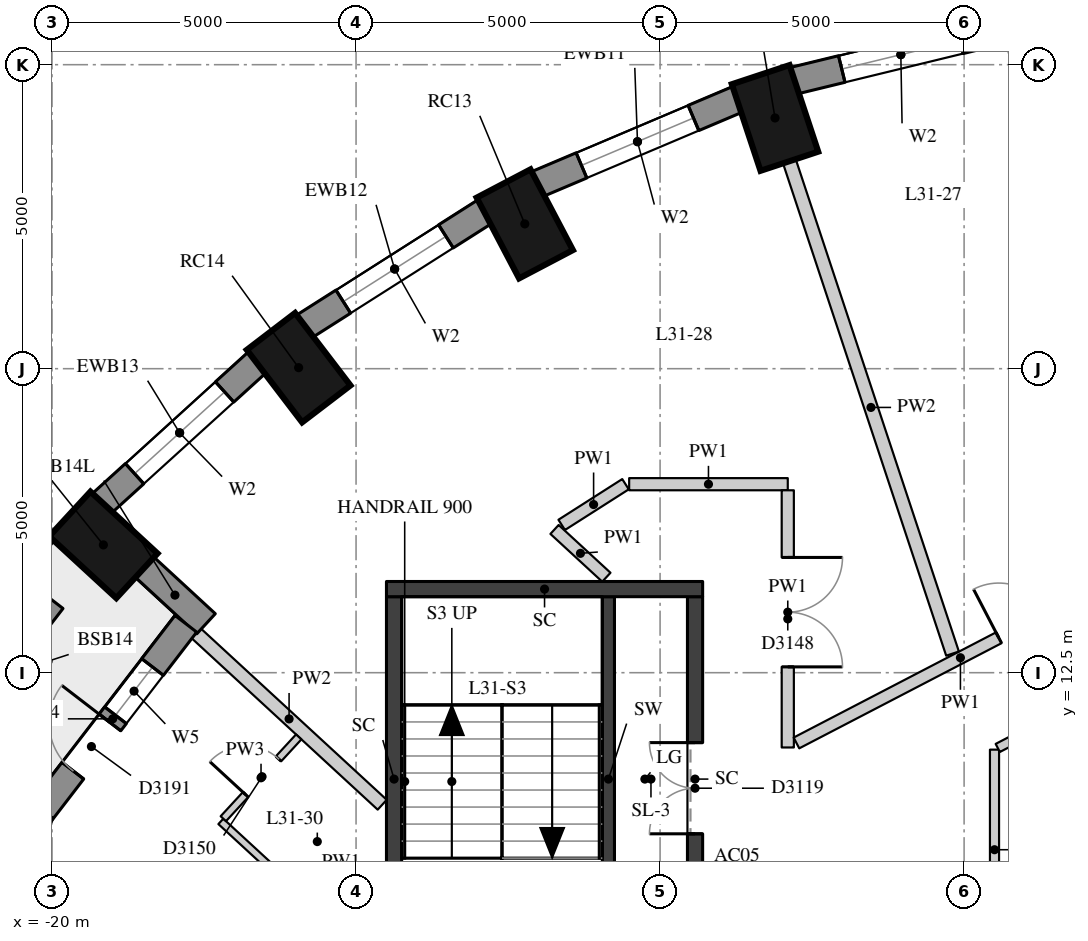
"""IFC4 building model, lengths in metres.
Left out: names, types, materials, properties, quantities, classifications, styles, units other than length and angle.
Written with IfcOpenShell. Run it as: python <this file> out.ifc"""

import sys

from ifc_helpers import new_model, si_unit, direction, frame, frame_2d, origin, origin_2d, place, context, subcontext, project, spatial, rectangle, extrude, element, fill, save


model = new_model("IFC4")
c1 = context("Model", 3, precision=1e-05, world=origin(), true_north=direction((0.0, 1.0)))
c2 = subcontext(c1, "Body", "Model", "MODEL_VIEW")
j1 = project(units=[si_unit("LENGTHUNIT", "METRE"), si_unit("PLANEANGLEUNIT", "RADIAN")], contexts=[c1])
p1 = place(None, origin())
s1 = spatial("IfcSite", under=j1, at=p1, CompositionType="ELEMENT")
p2 = place(p1, origin())
s2 = spatial("IfcBuilding", under=s1, at=p2, CompositionType="ELEMENT")
p3 = place(p2, frame((0.0, 0.0, 112.0)))
s3 = spatial("IfcBuildingStorey", under=s2, at=p3, CompositionType="ELEMENT", Elevation=112.0)
for number, where, z_axis, x_axis in (
    (1, (-3.724, 22.691, 0.0), (0.0, 0.0, 1.0), (-0.159, 0.987, 0.0)),
    (2, (-8.11, 21.624, 0.0), (0.0, 0.0, 1.0), (-0.315, 0.949, 0.0)),
    (3, (-12.225, 19.882, 0.0), (0.0, 0.0, 1.0), (-0.465, 0.885, 0.0)),
    (4, (-15.945, 17.517, 0.0), (0.0, 0.0, 1.0), (-0.607, 0.795, 0.0)),
    (5, (-19.156, 14.602, 0.0), (0.0, 0.0, 1.0), (-0.735, 0.678, 0.0)),
):
    element("IfcColumn", number, at=place(p3, frame(where, z_axis=z_axis, x_axis=x_axis)), inside=s3, PredefinedType="COLUMN", context=c2, shape_type="SweptSolid", body=[
        extrude(rectangle(XDim=1.5, YDim=1.0, at=origin_2d()), origin(), (0.0, 0.0, 1.0), 3.3),
    ])
p4 = place(p3, frame((-4.275, 23.094, 0.0), z_axis=(0.0, 0.0, 1.0), x_axis=(-0.971667603162, -0.236351579148, 0.0)))
e6 = element("IfcWall", 6, at=p4, inside=s3, PredefinedType="SOLIDWALL", context=c2, shape_type="SweptSolid", body=[
    extrude(rectangle(XDim=3.635, YDim=0.45, at=frame_2d((1.817, 0.0))), origin(), (0.0, 0.0, 1.0), 3.02),
])
p5 = place(p4, frame((0.817, 0.0, 0.4)))
e7 = element("IfcOpeningElement", 7, at=p5, cuts=e6, PredefinedType="OPENING", context=c2, shape_type="SweptSolid", body=[
    extrude(rectangle(XDim=2.0, YDim=1.75, at=frame_2d((1.0, 0.875))), frame((0.0, 0.235, 0.0), z_axis=(0.0, -1.0, 0.0), x_axis=(1.0, 0.0, 0.0)), (0.0, 0.0, 1.0), 0.47),
])
p6 = place(p3, frame((-8.718, 21.934, 0.0), z_axis=(0.0, 0.0, 1.0), x_axis=(-0.920879975612, -0.389846213932, 0.0)))
e8 = element("IfcWall", 8, at=p6, inside=s3, PredefinedType="SOLIDWALL", context=c2, shape_type="SweptSolid", body=[
    extrude(rectangle(XDim=3.592, YDim=0.45, at=frame_2d((1.796, 0.0))), origin(), (0.0, 0.0, 1.0), 3.02),
])
p7 = place(p6, frame((0.796, 0.0, 0.4)))
e9 = element("IfcOpeningElement", 9, at=p7, cuts=e8, PredefinedType="OPENING", context=c2, shape_type="SweptSolid", body=[
    extrude(rectangle(XDim=2.0, YDim=1.75, at=frame_2d((1.0, 0.875))), frame((0.0, 0.235, 0.0), z_axis=(0.0, -1.0, 0.0), x_axis=(1.0, 0.0, 0.0)), (0.0, 0.0, 1.0), 0.47),
])
p8 = place(p3, frame((-12.875, 20.087, 0.0), z_axis=(0.0, 0.0, 1.0), x_axis=(-0.843860651879, -0.536562391722, 0.0)))
e10 = element("IfcWall", 10, at=p8, inside=s3, PredefinedType="SOLIDWALL", context=c2, shape_type="SweptSolid", body=[
    extrude(rectangle(XDim=3.532, YDim=0.45, at=frame_2d((1.766, 0.0))), origin(), (0.0, 0.0, 1.0), 3.02),
])
p9 = place(p8, frame((0.766, 0.0, 0.4)))
e11 = element("IfcOpeningElement", 11, at=p9, cuts=e10, PredefinedType="OPENING", context=c2, shape_type="SweptSolid", body=[
    extrude(rectangle(XDim=2.0, YDim=1.75, at=frame_2d((1.0, 0.875))), frame((0.0, 0.235, 0.0), z_axis=(0.0, -1.0, 0.0), x_axis=(1.0, 0.0, 0.0)), (0.0, 0.0, 1.0), 0.47),
])
p10 = place(p3, frame((-16.62, 17.61, 0.0), z_axis=(0.0, 0.0, 1.0), x_axis=(-0.74032902847, -0.672244694739, 0.0)))
e12 = element("IfcWall", 12, at=p10, inside=s3, PredefinedType="SOLIDWALL", context=c2, shape_type="SweptSolid", body=[
    extrude(rectangle(XDim=3.464, YDim=0.45, at=frame_2d((1.732, 0.0))), origin(), (0.0, 0.0, 1.0), 3.02),
])
p11 = place(p10, frame((0.732, 0.0, 0.4)))
e13 = element("IfcOpeningElement", 13, at=p11, cuts=e12, PredefinedType="OPENING", context=c2, shape_type="SweptSolid", body=[
    extrude(rectangle(XDim=2.0, YDim=1.75, at=frame_2d((1.0, 0.875))), frame((0.0, 0.235, 0.0), z_axis=(0.0, -1.0, 0.0), x_axis=(1.0, 0.0, 0.0)), (0.0, 0.0, 1.0), 0.47),
])
p12 = place(p3, frame((-18.49, 14.247, 0.0), z_axis=(0.0, 0.0, 1.0), x_axis=(0.735307968822, -0.67773312667, 0.0)))
e14 = element("IfcWall", 14, at=p12, inside=s3, PredefinedType="SOLIDWALL", context=c2, shape_type="SweptSolid", body=[
    extrude(rectangle(XDim=1.391, YDim=0.45, at=frame_2d((0.695, 0.0))), origin(), (0.0, 0.0, 1.0), 3.02),
])
p13 = place(p3, frame((-17.799, 13.304, 0.0), z_axis=(0.0, 0.0, 1.0), x_axis=(-0.609698797728, -0.792633191362, 0.0)))
e15 = element("IfcWall", 15, at=p13, inside=s3, PredefinedType="SOLIDWALL", context=c2, shape_type="SweptSolid", body=[
    extrude(rectangle(XDim=3.945, YDim=0.45, at=frame_2d((1.973, 0.0))), origin(), (0.0, 0.0, 1.0), 3.02),
])
p14 = place(p13, frame((0.897, 0.0, 0.4)))
e16 = element("IfcOpeningElement", 16, at=p14, cuts=e15, PredefinedType="OPENING", context=c2, shape_type="SweptSolid", body=[
    extrude(rectangle(XDim=1.0, YDim=1.75, at=frame_2d((0.5, 0.875))), frame((0.0, 0.235, 0.0), z_axis=(0.0, -1.0, 0.0), x_axis=(1.0, 0.0, 0.0)), (0.0, 0.0, 1.0), 0.47),
])
p15 = place(p13, frame((2.047, 0.0, 0.0)))
e17 = element("IfcOpeningElement", 17, at=p15, cuts=e15, PredefinedType="OPENING", context=c2, shape_type="SweptSolid", body=[
    extrude(rectangle(XDim=1.0, YDim=2.15, at=frame_2d((0.5, 1.075))), frame((0.0, 0.235, 0.0), z_axis=(0.0, -1.0, 0.0), x_axis=(1.0, 0.0, 0.0)), (0.0, 0.0, 1.0), 0.47),
])
p16 = place(p3, frame((-20.182, 10.212, 0.0), z_axis=(0.0, 0.0, 1.0), x_axis=(-0.455932890657, -0.890014156751, 0.0)))
e18 = element("IfcWall", 18, at=p16, inside=s3, PredefinedType="SOLIDWALL", context=c2, shape_type="SweptSolid", body=[
    extrude(rectangle(XDim=3.888, YDim=0.45, at=frame_2d((1.944, 0.0))), origin(), (0.0, 0.0, 1.0), 3.02),
])
p17 = place(p16, frame((0.869, 0.0, 0.4)))
e19 = element("IfcOpeningElement", 19, at=p17, cuts=e18, PredefinedType="OPENING", context=c2, shape_type="SweptSolid", body=[
    extrude(rectangle(XDim=1.0, YDim=1.75, at=frame_2d((0.5, 0.875))), frame((0.0, 0.235, 0.0), z_axis=(0.0, -1.0, 0.0), x_axis=(1.0, 0.0, 0.0)), (0.0, 0.0, 1.0), 0.47),
])
p18 = place(p16, frame((2.019, 0.0, 0.0)))
e20 = element("IfcOpeningElement", 20, at=p18, cuts=e18, PredefinedType="OPENING", context=c2, shape_type="SweptSolid", body=[
    extrude(rectangle(XDim=1.0, YDim=2.15, at=frame_2d((0.5, 1.075))), frame((0.0, 0.235, 0.0), z_axis=(0.0, -1.0, 0.0), x_axis=(1.0, 0.0, 0.0)), (0.0, 0.0, 1.0), 0.47),
])
p19 = place(p3, frame((-20.096, 13.77, 0.0), z_axis=(0.0, 0.0, 1.0), x_axis=(-0.610752434717, -0.791821610899, 0.0)))
e21 = element("IfcWall", 21, at=p19, inside=s3, PredefinedType="USERDEFINED", context=c2, shape_type="SweptSolid", body=[
    extrude(rectangle(XDim=1.8, YDim=0.7, at=frame_2d((0.9, 0.0))), origin(), (0.0, 0.0, 1.0), 0.75),
])
p20 = place(p3, frame((-10.85, 7.75, 0.0), z_axis=(0.0, 0.0, 1.0), x_axis=(0.0, 1.0, 0.0)))
e22 = element("IfcWall", 22, at=p20, inside=s3, PredefinedType="SHEAR", context=c2, shape_type="SweptSolid", body=[
    extrude(rectangle(XDim=6.0, YDim=0.2, at=frame_2d((3.0, 0.0))), origin(), (0.0, 0.0, 1.0), 3.02),
])
p21 = place(p20, frame((0.1, 0.0, 0.0)))
e23 = element("IfcOpeningElement", 23, at=p21, cuts=e22, PredefinedType="OPENING", context=c2, shape_type="SweptSolid", body=[
    extrude(rectangle(XDim=1.5, YDim=2.1, at=frame_2d((0.75, 1.05))), frame((0.0, 0.11, 0.0), z_axis=(0.0, -1.0, 0.0), x_axis=(1.0, 0.0, 0.0)), (0.0, 0.0, 1.0), 0.22),
])
p22 = place(p3, frame((-14.375, 7.75, -0.28), z_axis=(0.0, 0.0, 1.0), x_axis=(0.0, 1.0, 0.0)))
e24 = element("IfcWall", 24, at=p22, inside=s3, PredefinedType="SHEAR", context=c2, shape_type="SweptSolid", body=[
    extrude(rectangle(XDim=6.0, YDim=0.25, at=frame_2d((3.0, 0.0))), origin(), (0.0, 0.0, 1.0), 3.3),
])
p23 = place(p3, frame((-9.425, 7.75, -0.28), z_axis=(0.0, 0.0, 1.0), x_axis=(0.0, 1.0, 0.0)))
e25 = element("IfcWall", 25, at=p23, inside=s3, PredefinedType="SHEAR", context=c2, shape_type="SweptSolid", body=[
    extrude(rectangle(XDim=6.0, YDim=0.25, at=frame_2d((3.0, 0.0))), origin(), (0.0, 0.0, 1.0), 3.3),
])
p24 = place(p23, frame((2.1, 0.0, 0.28)))
e26 = element("IfcOpeningElement", 26, at=p24, cuts=e25, PredefinedType="OPENING", context=c2, shape_type="SweptSolid", body=[
    extrude(rectangle(XDim=1.5, YDim=2.1, at=frame_2d((0.75, 1.05))), frame((0.0, 0.135, 0.0), z_axis=(0.0, -1.0, 0.0), x_axis=(1.0, 0.0, 0.0)), (0.0, 0.0, 1.0), 0.27),
])
p25 = place(p3, frame((-14.5, 13.875, -0.28), z_axis=(0.0, 0.0, 1.0), x_axis=(1.0, 0.0, 0.0)))
e27 = element("IfcWall", 27, at=p25, inside=s3, PredefinedType="SHEAR", context=c2, shape_type="SweptSolid", body=[
    extrude(rectangle(XDim=5.2, YDim=0.25, at=frame_2d((2.6, 0.0))), origin(), (0.0, 0.0, 1.0), 3.3),
])
p26 = place(p3, frame((-10.883, 14.07, 0.0), z_axis=(0.0, 0.0, 1.0), x_axis=(-0.735263405477, 0.677781472575, 0.0)))
e28 = element("IfcWall", 28, at=p26, inside=s3, PredefinedType="PARTITIONING", context=c2, shape_type="SweptSolid", body=[
    extrude(rectangle(XDim=1.159, YDim=0.2, at=frame_2d((0.58, 0.0))), origin(), (0.0, 0.0, 1.0), 3.02),
])
p27 = place(p3, frame((-11.618, 14.931, 0.0), z_axis=(0.0, 0.0, 1.0), x_axis=(0.84322497481, 0.537560826193, 0.0)))
e29 = element("IfcWall", 29, at=p27, inside=s3, PredefinedType="PARTITIONING", context=c2, shape_type="SweptSolid", body=[
    extrude(rectangle(XDim=1.244, YDim=0.2, at=frame_2d((0.622, 0.0))), origin(), (0.0, 0.0, 1.0), 3.02),
])
p28 = place(p3, frame((-10.509, 15.6, 0.0), z_axis=(0.0, 0.0, 1.0), x_axis=(1.0, 0.0, 0.0)))
e30 = element("IfcWall", 30, at=p28, inside=s3, PredefinedType="PARTITIONING", context=c2, shape_type="SweptSolid", body=[
    extrude(rectangle(XDim=2.609, YDim=0.2, at=frame_2d((1.304, 0.0))), origin(), (0.0, 0.0, 1.0), 3.02),
])
p29 = place(p3, frame((-7.9, 15.5, 0.0), z_axis=(0.0, 0.0, 1.0), x_axis=(0.0, -1.0, 0.0)))
e31 = element("IfcWall", 31, at=p29, inside=s3, PredefinedType="PARTITIONING", context=c2, shape_type="SweptSolid", body=[
    extrude(rectangle(XDim=4.23, YDim=0.2, at=frame_2d((2.115, 0.0))), origin(), (0.0, 0.0, 1.0), 3.02),
])
p30 = place(p29, frame((1.104, 0.0, 0.0)))
e32 = element("IfcOpeningElement", 32, at=p30, cuts=e31, PredefinedType="OPENING", context=c2, shape_type="SweptSolid", body=[
    extrude(rectangle(XDim=1.8, YDim=2.1, at=frame_2d((0.9, 1.05))), frame((0.0, 0.11, 0.0), z_axis=(0.0, -1.0, 0.0), x_axis=(1.0, 0.0, 0.0)), (0.0, 0.0, 1.0), 0.22),
])
p31 = place(p3, frame((-7.757, 11.344, 0.0), z_axis=(0.0, 0.0, 1.0), x_axis=(0.887263483993, 0.461262951008, 0.0)))
e33 = element("IfcWall", 33, at=p31, inside=s3, PredefinedType="PARTITIONING", context=c2, shape_type="SweptSolid", body=[
    extrude(rectangle(XDim=6.079, YDim=0.2, at=frame_2d((3.04, 0.0))), origin(), (0.0, 0.0, 1.0), 3.02),
])
p32 = place(p31, frame((3.75, 0.0, 0.0)))
e34 = element("IfcOpeningElement", 34, at=p32, cuts=e33, PredefinedType="OPENING", context=c2, shape_type="SweptSolid", body=[
    extrude(rectangle(XDim=0.9, YDim=2.1, at=frame_2d((0.45, 1.05))), frame((0.0, 0.11, 0.0), z_axis=(0.0, -1.0, 0.0), x_axis=(1.0, 0.0, 0.0)), (0.0, 0.0, 1.0), 0.22),
])
p33 = place(p3, frame((-4.5, 7.942, 0.0), z_axis=(0.0, 0.0, 1.0), x_axis=(0.0, 1.0, 0.0)))
e35 = element("IfcWall", 35, at=p33, inside=s3, PredefinedType="PARTITIONING", context=c2, shape_type="SweptSolid", body=[
    extrude(rectangle(XDim=3.292, YDim=0.15, at=frame_2d((1.646, 0.0))), origin(), (0.0, 0.0, 1.0), 3.02),
])
p34 = place(p3, frame((-4.447, 11.262, 0.0), z_axis=(0.0, 0.0, 1.0), x_axis=(0.887294207503, 0.461203847915, 0.0)))
e36 = element("IfcWall", 36, at=p34, inside=s3, PredefinedType="PARTITIONING", context=c2, shape_type="SweptSolid", body=[
    extrude(rectangle(XDim=2.788, YDim=0.15, at=frame_2d((1.394, 0.0))), origin(), (0.0, 0.0, 1.0), 3.02),
])
p35 = place(p3, frame((-7.874, 20.912, 0.0), z_axis=(0.0, 0.0, 1.0), x_axis=(0.314561749761, -0.949237012335, 0.0)))
e37 = element("IfcWall", 37, at=p35, inside=s3, PredefinedType="PARTITIONING", context=c2, shape_type="SweptSolid", body=[
    extrude(rectangle(XDim=8.531, YDim=0.22, at=frame_2d((4.266, 0.0))), origin(), (0.0, 0.0, 1.0), 3.02),
])
p36 = place(p3, frame((-17.633, 13.151, 0.0), z_axis=(0.0, 0.0, 1.0), x_axis=(0.73535370522, -0.677683501511, 0.0)))
e38 = element("IfcWall", 38, at=p36, inside=s3, PredefinedType="PARTITIONING", context=c2, shape_type="SweptSolid", body=[
    extrude(rectangle(XDim=4.166, YDim=0.22, at=frame_2d((2.083, 0.0))), origin(), (0.0, 0.0, 1.0), 3.02),
])
p37 = place(p3, frame((-15.387, 8.362, 0.0), z_axis=(0.0, 0.0, 1.0), x_axis=(-0.735313004993, 0.677727662626, 0.0)))
e39 = element("IfcWall", 39, at=p37, inside=s3, PredefinedType="PARTITIONING", context=c2, shape_type="SweptSolid", body=[
    extrude(rectangle(XDim=2.497, YDim=0.12, at=frame_2d((1.249, 0.0))), origin(), (0.0, 0.0, 1.0), 3.02),
])
p38 = place(p3, frame((-17.183, 10.098, 0.0), z_axis=(0.0, 0.0, 1.0), x_axis=(0.677631502542, 0.735401622763, 0.0)))
e40 = element("IfcWall", 40, at=p38, inside=s3, PredefinedType="PARTITIONING", context=c2, shape_type="SweptSolid", body=[
    extrude(rectangle(XDim=1.83, YDim=0.12, at=frame_2d((0.915, 0.0))), origin(), (0.0, 0.0, 1.0), 3.02),
])
p39 = place(p38, frame((0.54, 0.0, 0.0)))
e41 = element("IfcOpeningElement", 41, at=p39, cuts=e40, PredefinedType="OPENING", context=c2, shape_type="SweptSolid", body=[
    extrude(rectangle(XDim=0.8, YDim=2.1, at=frame_2d((0.4, 1.05))), frame((0.0, 0.07, 0.0), z_axis=(0.0, -1.0, 0.0), x_axis=(1.0, 0.0, 0.0)), (0.0, 0.0, 1.0), 0.14),
])
p40 = place(p5, origin())
e42 = element("IfcWindow", 42, at=p40, inside=s3, PartitioningType="SINGLE_PANEL", PredefinedType="WINDOW", context=c2, shape_type="SweptSolid", body=[
    extrude(rectangle(XDim=2.0, YDim=1.75, at=frame_2d((1.0, 0.875))), frame((0.0, 0.035, 0.0), z_axis=(0.0, -1.0, 0.0), x_axis=(1.0, 0.0, 0.0)), (0.0, 0.0, 1.0), 0.06),
])
fill(e7, e42)
p41 = place(p7, origin())
e43 = element("IfcWindow", 43, at=p41, inside=s3, PartitioningType="SINGLE_PANEL", PredefinedType="WINDOW", context=c2, shape_type="SweptSolid", body=[
    extrude(rectangle(XDim=2.0, YDim=1.75, at=frame_2d((1.0, 0.875))), frame((0.0, 0.035, 0.0), z_axis=(0.0, -1.0, 0.0), x_axis=(1.0, 0.0, 0.0)), (0.0, 0.0, 1.0), 0.06),
])
fill(e9, e43)
p42 = place(p9, origin())
e44 = element("IfcWindow", 44, at=p42, inside=s3, PartitioningType="SINGLE_PANEL", PredefinedType="WINDOW", context=c2, shape_type="SweptSolid", body=[
    extrude(rectangle(XDim=2.0, YDim=1.75, at=frame_2d((1.0, 0.875))), frame((0.0, 0.035, 0.0), z_axis=(0.0, -1.0, 0.0), x_axis=(1.0, 0.0, 0.0)), (0.0, 0.0, 1.0), 0.06),
])
fill(e11, e44)
p43 = place(p11, origin())
e45 = element("IfcWindow", 45, at=p43, inside=s3, PartitioningType="SINGLE_PANEL", PredefinedType="WINDOW", context=c2, shape_type="SweptSolid", body=[
    extrude(rectangle(XDim=2.0, YDim=1.75, at=frame_2d((1.0, 0.875))), frame((0.0, 0.035, 0.0), z_axis=(0.0, -1.0, 0.0), x_axis=(1.0, 0.0, 0.0)), (0.0, 0.0, 1.0), 0.06),
])
fill(e13, e45)
p44 = place(p14, origin())
e46 = element("IfcWindow", 46, at=p44, inside=s3, PartitioningType="SINGLE_PANEL", PredefinedType="WINDOW", context=c2, shape_type="SweptSolid", body=[
    extrude(rectangle(XDim=1.0, YDim=1.75, at=frame_2d((0.5, 0.875))), frame((0.0, 0.035, 0.0), z_axis=(0.0, -1.0, 0.0), x_axis=(1.0, 0.0, 0.0)), (0.0, 0.0, 1.0), 0.06),
])
fill(e16, e46)
p45 = place(p15, frame((1.0, 0.0, 0.0), z_axis=(0.0, 0.0, 1.0), x_axis=(-1.0, 0.0, 0.0)))
e47 = element("IfcDoor", 47, at=p45, inside=s3, OperationType="SINGLE_SWING_RIGHT", PredefinedType="DOOR", context=c2, shape_type="SweptSolid", body=[
    extrude(rectangle(XDim=1.0, YDim=2.15, at=frame_2d((0.5, 1.075))), frame((0.0, 0.075, 0.0), z_axis=(0.0, -1.0, 0.0), x_axis=(1.0, 0.0, 0.0)), (0.0, 0.0, 1.0), 0.05),
])
fill(e17, e47)
p46 = place(p24, origin())
e48 = element("IfcDoor", 48, at=p46, inside=s3, OperationType="DOUBLE_DOOR_SINGLE_SWING", PredefinedType="DOOR", context=c2, shape_type="SweptSolid", body=[
    extrude(rectangle(XDim=1.5, YDim=2.1, at=frame_2d((0.75, 1.05))), frame((0.0, 0.025, 0.0), z_axis=(0.0, -1.0, 0.0), x_axis=(1.0, 0.0, 0.0)), (0.0, 0.0, 1.0), 0.05),
])
fill(e26, e48)
p47 = place(p32, origin())
e49 = element("IfcDoor", 49, at=p47, inside=s3, OperationType="SINGLE_SWING_LEFT", PredefinedType="DOOR", context=c2, shape_type="SweptSolid", body=[
    extrude(rectangle(XDim=0.9, YDim=2.1, at=frame_2d((0.45, 1.05))), frame((0.0, 0.025, 0.0), z_axis=(0.0, -1.0, 0.0), x_axis=(1.0, 0.0, 0.0)), (0.0, 0.0, 1.0), 0.05),
])
fill(e34, e49)
p48 = place(p30, origin())
e50 = element("IfcDoor", 50, at=p48, inside=s3, OperationType="DOUBLE_DOOR_SINGLE_SWING", PredefinedType="DOOR", context=c2, shape_type="SweptSolid", body=[
    extrude(rectangle(XDim=1.8, YDim=2.1, at=frame_2d((0.9, 1.05))), frame((0.0, 0.025, 0.0), z_axis=(0.0, -1.0, 0.0), x_axis=(1.0, 0.0, 0.0)), (0.0, 0.0, 1.0), 0.05),
])
fill(e32, e50)
p49 = place(p39, origin())
e51 = element("IfcDoor", 51, at=p49, inside=s3, OperationType="SINGLE_SWING_LEFT", PredefinedType="DOOR", context=c2, shape_type="SweptSolid", body=[
    extrude(rectangle(XDim=0.8, YDim=2.1, at=frame_2d((0.4, 1.05))), frame((0.0, 0.025, 0.0), z_axis=(0.0, -1.0, 0.0), x_axis=(1.0, 0.0, 0.0)), (0.0, 0.0, 1.0), 0.05),
])
fill(e41, e51)
save(model, sys.argv[1])
